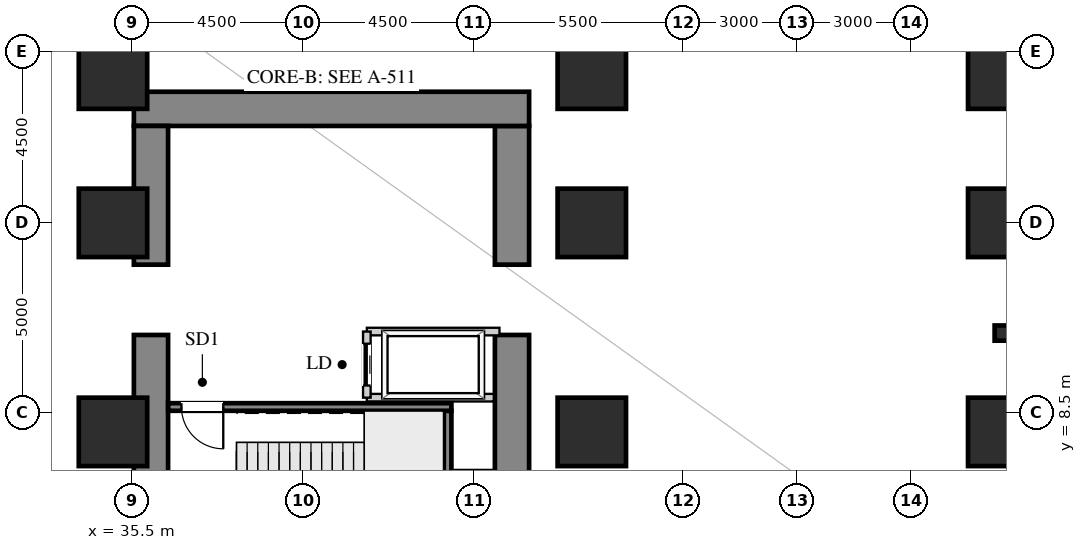
"""IFC4 building model, lengths in metres.
Left out: names, types, materials, properties, quantities, classifications, styles, units other than length and angle.
Written with IfcOpenShell. Run it as: python <this file> out.ifc"""

import sys

from ifc_helpers import new_model, si_unit, direction, frame, frame_2d, origin, origin_2d, place, context, subcontext, project, spatial, rectangle, hollow_rectangle, extrude, source, transform, mapped, element, fill, save


model = new_model("IFC4")
c1 = context("Model", 3, precision=1e-05, world=origin(), true_north=direction((0.0, 1.0)))
c2 = subcontext(c1, "Body", "Model", "MODEL_VIEW")
j1 = project(units=[si_unit("LENGTHUNIT", "METRE"), si_unit("PLANEANGLEUNIT", "RADIAN")], contexts=[c1])
p1 = place(None, origin())
s1 = spatial("IfcSite", under=j1, at=p1, CompositionType="ELEMENT")
p2 = place(p1, origin())
s2 = spatial("IfcBuilding", under=s1, at=p2, CompositionType="ELEMENT")
p3 = place(p2, frame((0.0, 0.0, -9.0)))
s3 = spatial("IfcBuildingStorey", under=s2, at=p3, CompositionType="ELEMENT", Elevation=-9.0)
m1 = source(origin(), c2, "Body", "SweptSolid", [
    extrude(rectangle(XDim=1.8, YDim=1.8, at=origin_2d()), origin(), (0.0, 0.0, 1.0), 4.2),
])
for number, where, z_axis, x_axis in (
    (1, (58.4, 8.0, 0.0), (0.0, 0.0, 1.0), (1.0, 0.0, 0.0)),
    (2, (58.4, 13.5, 0.0), (0.0, 0.0, 1.0), (1.0, 0.0, 0.0)),
    (3, (58.4, 17.4, 0.0), (0.0, 0.0, 1.0), (1.0, 0.0, 0.0)),
    (4, (47.6, 8.0, 0.0), (0.0, 0.0, 1.0), (1.0, 0.0, 0.0)),
    (5, (47.6, 13.5, 0.0), (0.0, 0.0, 1.0), (1.0, 0.0, 0.0)),
    (6, (47.6, 17.4, 0.0), (0.0, 0.0, 1.0), (1.0, 0.0, 0.0)),
    (7, (35.0, 8.0, 0.0), (0.0, 0.0, 1.0), (1.0, 0.0, 0.0)),
    (8, (35.0, 13.5, 0.0), (0.0, 0.0, 1.0), (1.0, 0.0, 0.0)),
    (9, (35.0, 17.4, 0.0), (0.0, 0.0, 1.0), (1.0, 0.0, 0.0)),
):
    element("IfcColumn", number, at=place(p3, frame(where, z_axis=z_axis, x_axis=x_axis)), inside=s3, PredefinedType="COLUMN", context=c2, shape_type="MappedRepresentation", body=[
        mapped(m1, transform((0.0, 0.0, 0.0), x_axis=(1.0, 0.0, 0.0), y_axis=(0.0, 1.0, 0.0), z_axis=(0.0, 0.0, 1.0))),
    ])
m2 = source(origin(), c2, "Body", "SweptSolid", [
    extrude(hollow_rectangle(XDim=0.4, YDim=0.4, WallThickness=0.02, at=origin_2d()), origin(), (0.0, 0.0, 1.0), 4.2),
])
p4 = place(p3, frame((58.4, 10.6, 0.0), z_axis=(0.0, 0.0, 1.0), x_axis=(1.0, 0.0, 0.0)))
e10 = element("IfcColumn", 10, at=p4, inside=s3, PredefinedType="PILASTER", context=c2, shape_type="MappedRepresentation", body=[
    mapped(m2, transform((0.0, 0.0, 0.0), x_axis=(1.0, 0.0, 0.0), y_axis=(0.0, 1.0, 0.0), z_axis=(0.0, 0.0, 1.0))),
])
m3 = source(origin(), c2, "Body", "SweptSolid", [
    extrude(rectangle(XDim=5.6, YDim=0.9, at=frame_2d((2.8, 0.0))), origin(), (0.0, 0.0, 1.0), 4.2),
])
p5 = place(p3, frame((45.5, 4.95, 0.0), z_axis=(0.0, 0.0, 1.0), x_axis=(0.0, 1.0, 0.0)))
e11 = element("IfcWall", 11, at=p5, inside=s3, PredefinedType="SHEAR", context=c2, shape_type="MappedRepresentation", body=[
    mapped(m3, transform((0.0, 0.0, 0.0), x_axis=(1.0, 0.0, 0.0), y_axis=(0.0, 1.0, 0.0), z_axis=(0.0, 0.0, 1.0))),
])
m4 = source(origin(), c2, "Body", "SweptSolid", [
    extrude(rectangle(XDim=3.65, YDim=0.9, at=frame_2d((1.825, 0.0))), origin(), (0.0, 0.0, 1.0), 4.2),
])
p6 = place(p3, frame((45.5, 12.4, 0.0), z_axis=(0.0, 0.0, 1.0), x_axis=(0.0, 1.0, 0.0)))
e12 = element("IfcWall", 12, at=p6, inside=s3, PredefinedType="SHEAR", context=c2, shape_type="MappedRepresentation", body=[
    mapped(m4, transform((0.0, 0.0, 0.0), x_axis=(1.0, 0.0, 0.0), y_axis=(0.0, 1.0, 0.0), z_axis=(0.0, 0.0, 1.0))),
])
m5 = source(origin(), c2, "Body", "SweptSolid", [
    extrude(rectangle(XDim=10.4, YDim=0.9, at=frame_2d((5.2, 0.0))), origin(), (0.0, 0.0, 1.0), 4.2),
])
p7 = place(p3, frame((35.55, 16.5, 0.0), z_axis=(0.0, 0.0, 1.0), x_axis=(1.0, 0.0, 0.0)))
e13 = element("IfcWall", 13, at=p7, inside=s3, PredefinedType="SHEAR", context=c2, shape_type="MappedRepresentation", body=[
    mapped(m5, transform((0.0, 0.0, 0.0), x_axis=(1.0, 0.0, 0.0), y_axis=(0.0, 1.0, 0.0), z_axis=(0.0, 0.0, 1.0))),
])
p8 = place(p3, frame((36.0, 4.95, 0.0), z_axis=(0.0, 0.0, 1.0), x_axis=(0.0, 1.0, 0.0)))
e14 = element("IfcWall", 14, at=p8, inside=s3, PredefinedType="SHEAR", context=c2, shape_type="MappedRepresentation", body=[
    mapped(m3, transform((0.0, 0.0, 0.0), x_axis=(1.0, 0.0, 0.0), y_axis=(0.0, 1.0, 0.0), z_axis=(0.0, 0.0, 1.0))),
])
p9 = place(p3, frame((36.0, 12.4, 0.0), z_axis=(0.0, 0.0, 1.0), x_axis=(0.0, 1.0, 0.0)))
e15 = element("IfcWall", 15, at=p9, inside=s3, PredefinedType="SHEAR", context=c2, shape_type="MappedRepresentation", body=[
    mapped(m4, transform((0.0, 0.0, 0.0), x_axis=(1.0, 0.0, 0.0), y_axis=(0.0, 1.0, 0.0), z_axis=(0.0, 0.0, 1.0))),
])
m6 = source(origin(), c2, "Body", "SweptSolid", [
    extrude(rectangle(XDim=3.49, YDim=0.2, at=frame_2d((1.745, 0.0))), origin(), (0.0, 0.0, 1.0), 4.185),
])
p10 = place(p3, frame((41.68, 10.64, 0.0), z_axis=(0.0, 0.0, 1.0), x_axis=(1.0, 0.0, 0.0)))
e16 = element("IfcWall", 16, at=p10, inside=s3, PredefinedType="PARTITIONING", context=c2, shape_type="MappedRepresentation", body=[
    mapped(m6, transform((0.0, 0.0, 0.0), x_axis=(1.0, 0.0, 0.0), y_axis=(0.0, 1.0, 0.0), z_axis=(0.0, 0.0, 1.0))),
])
m7 = source(origin(), c2, "Body", "SweptSolid", [
    extrude(rectangle(XDim=3.34, YDim=0.2, at=frame_2d((1.67, 0.0))), origin(), (0.0, 0.0, 1.0), 4.185),
])
p11 = place(p3, frame((41.68, 8.9, 0.0), z_axis=(0.0, 0.0, 1.0), x_axis=(1.0, 0.0, 0.0)))
e17 = element("IfcWall", 17, at=p11, inside=s3, PredefinedType="PARTITIONING", context=c2, shape_type="MappedRepresentation", body=[
    mapped(m7, transform((0.0, 0.0, 0.0), x_axis=(1.0, 0.0, 0.0), y_axis=(0.0, 1.0, 0.0), z_axis=(0.0, 0.0, 1.0))),
])
p12 = place(p3, frame((41.68, 8.9, 0.0), z_axis=(0.0, 0.0, 1.0), x_axis=(0.0, 1.0, 0.0)))
e18 = element("IfcWall", 18, at=p12, inside=s3, PredefinedType="PARTITIONING", context=c2, shape_type="SweptSolid", body=[
    extrude(rectangle(XDim=1.74, YDim=0.2, at=frame_2d((0.87, 0.0))), origin(), (0.0, 0.0, 1.0), 4.185),
])
p13 = place(p12, frame((0.32, 0.0, 0.0)))
e19 = element("IfcOpeningElement", 19, at=p13, cuts=e18, PredefinedType="OPENING", context=c2, shape_type="SweptSolid", body=[
    extrude(rectangle(XDim=1.1, YDim=2.2, at=frame_2d((0.55, 1.1))), frame((0.0, 0.11, 0.0), z_axis=(0.0, -1.0, 0.0), x_axis=(1.0, 0.0, 0.0)), (0.0, 0.0, 1.0), 0.22),
])
m8 = source(origin(), c2, "Body", "SweptSolid", [
    extrude(rectangle(XDim=3.603, YDim=0.2, at=frame_2d((1.802, 0.0))), origin(), (0.0, 0.0, 1.0), 4.2),
])
p14 = place(p3, frame((43.805, 4.952, 0.0), z_axis=(0.0, 0.0, 1.0), x_axis=(0.0, 1.0, 0.0)))
e20 = element("IfcWall", 20, at=p14, inside=s3, PredefinedType="SHEAR", context=c2, shape_type="MappedRepresentation", body=[
    mapped(m8, transform((0.0, 0.0, 0.0), x_axis=(1.0, 0.0, 0.0), y_axis=(0.0, 1.0, 0.0), z_axis=(0.0, 0.0, 1.0))),
])
p15 = place(p3, frame((36.452, 8.655, 0.0), z_axis=(0.0, 0.0, 1.0), x_axis=(1.0, 0.0, 0.0)))
e21 = element("IfcWall", 21, at=p15, inside=s3, PredefinedType="SHEAR", context=c2, shape_type="SweptSolid", body=[
    extrude(rectangle(XDim=7.453, YDim=0.2, at=frame_2d((3.727, 0.0))), origin(), (0.0, 0.0, 1.0), 4.2),
])
p16 = place(p15, frame((0.35, 0.0, 0.0)))
e22 = element("IfcOpeningElement", 22, at=p16, cuts=e21, PredefinedType="OPENING", context=c2, shape_type="SweptSolid", body=[
    extrude(rectangle(XDim=1.1, YDim=2.15, at=frame_2d((0.55, 1.075))), frame((0.0, 0.11, 0.0), z_axis=(0.0, -1.0, 0.0), x_axis=(1.0, 0.0, 0.0)), (0.0, 0.0, 1.0), 0.22),
])
m9 = source(origin(), c2, "Body", "SweptSolid", [
    extrude(rectangle(XDim=1.1, YDim=2.2, at=frame_2d((0.55, 1.1))), frame((0.0, 0.025, 0.0), z_axis=(0.0, -1.0, 0.0), x_axis=(1.0, 0.0, 0.0)), (0.0, 0.0, 1.0), 0.05),
])
p17 = place(p13, origin())
e23 = element("IfcDoor", 23, at=p17, inside=s3, OperationType="SLIDING_TO_LEFT", PredefinedType="DOOR", context=c2, shape_type="MappedRepresentation", body=[
    mapped(m9, transform((0.0, 0.0, 0.0), x_axis=(1.0, 0.0, 0.0), y_axis=(0.0, 1.0, 0.0), z_axis=(0.0, 0.0, 1.0))),
])
fill(e19, e23)
m10 = source(origin(), c2, "Body", "SweptSolid", [
    extrude(rectangle(XDim=1.1, YDim=2.15, at=frame_2d((0.55, 1.075))), frame((0.0, 0.025, 0.0), z_axis=(0.0, -1.0, 0.0), x_axis=(1.0, 0.0, 0.0)), (0.0, 0.0, 1.0), 0.05),
])
p18 = place(p16, origin())
e24 = element("IfcDoor", 24, at=p18, inside=s3, OperationType="SINGLE_SWING_RIGHT", PredefinedType="DOOR", context=c2, shape_type="MappedRepresentation", body=[
    mapped(m10, transform((0.0, 0.0, 0.0), x_axis=(1.0, 0.0, 0.0), y_axis=(0.0, 1.0, 0.0), z_axis=(0.0, 0.0, 1.0))),
])
fill(e22, e24)
save(model, sys.argv[1])
